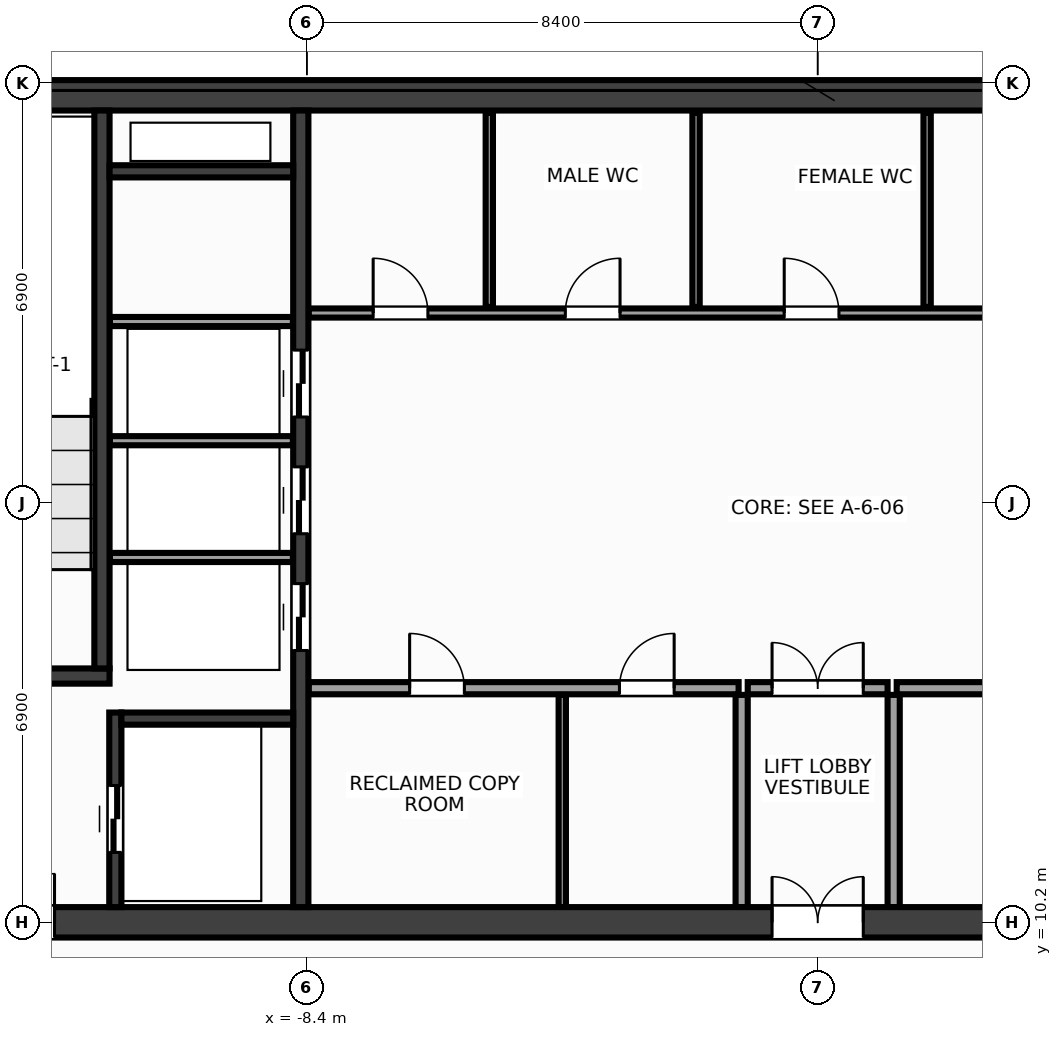
"""IFC4 building model, lengths in metres.
Left out: names, types, materials, properties, quantities, classifications, styles, units other than length and angle.
Written with IfcOpenShell. Run it as: python <this file> out.ifc"""

import sys

from ifc_helpers import new_model, si_unit, direction, frame, frame_2d, origin, place, context, subcontext, project, spatial, rectangle, extrude, source, transform, mapped, element, fill, save


model = new_model("IFC4")
c1 = context("Model", 3, precision=1e-05, world=origin(), true_north=direction((0.0, 1.0)))
c2 = subcontext(c1, "Body", "Model", "MODEL_VIEW")
j1 = project(units=[si_unit("LENGTHUNIT", "METRE"), si_unit("PLANEANGLEUNIT", "RADIAN")], contexts=[c1])
p1 = place(None, origin())
s1 = spatial("IfcSite", under=j1, at=p1, CompositionType="ELEMENT")
p2 = place(p1, origin())
s2 = spatial("IfcBuilding", under=s1, at=p2, CompositionType="ELEMENT")
p3 = place(p2, frame((0.0, 0.0, 210.8)))
s3 = spatial("IfcBuildingStorey", under=s2, at=p3, CompositionType="ELEMENT", Elevation=210.8)
m1 = source(origin(), c2, "Body", "SweptSolid", [
    extrude(rectangle(XDim=31.7, YDim=0.5, at=frame_2d((15.85, 0.0))), origin(), (0.0, 0.0, 1.0), 3.6),
])
p4 = place(p3, frame((-15.85, 23.8, 0.0), z_axis=(0.0, 0.0, 1.0), x_axis=(1.0, 0.0, 0.0)))
e1 = element("IfcWall", 1, at=p4, inside=s3, PredefinedType="SHEAR", context=c2, shape_type="MappedRepresentation", body=[
    mapped(m1, transform((0.0, 0.0, 0.0), x_axis=(1.0, 0.0, 0.0), y_axis=(0.0, 1.0, 0.0), z_axis=(0.0, 0.0, 1.0), scale=1.0)),
])
p5 = place(p3, frame((-15.85, 10.2, 0.0), z_axis=(0.0, 0.0, 1.0), x_axis=(1.0, 0.0, 0.0)))
e2 = element("IfcWall", 2, at=p5, inside=s3, PredefinedType="SHEAR", context=c2, shape_type="MappedRepresentation", body=[
    mapped(m1, transform((0.0, 0.0, 0.0), x_axis=(1.0, 0.0, 0.0), y_axis=(0.0, 1.0, 0.0), z_axis=(0.0, 0.0, 1.0), scale=1.0)),
])
p6 = place(p5, frame((1.7, 0.0, 0.0)))
e3 = element("IfcOpeningElement", 3, at=p6, cuts=e2, PredefinedType="OPENING", context=c2, shape_type="SweptSolid", body=[
    extrude(rectangle(XDim=1.6, YDim=2.15, at=frame_2d((0.8, 1.075))), frame((0.0, 0.262, 0.0), z_axis=(0.0, -1.0, 0.0), x_axis=(1.0, 0.0, 0.0)), (0.0, 0.0, 1.0), 0.524),
])
p7 = place(p5, frame((28.4, 0.0, 0.0)))
e4 = element("IfcOpeningElement", 4, at=p7, cuts=e2, PredefinedType="OPENING", context=c2, shape_type="SweptSolid", body=[
    extrude(rectangle(XDim=1.6, YDim=2.15, at=frame_2d((0.8, 1.075))), frame((0.0, 0.262, 0.0), z_axis=(0.0, -1.0, 0.0), x_axis=(1.0, 0.0, 0.0)), (0.0, 0.0, 1.0), 0.524),
])
p8 = place(p5, frame((15.1, 0.0, 0.0)))
e5 = element("IfcOpeningElement", 5, at=p8, cuts=e2, PredefinedType="OPENING", context=c2, shape_type="SweptSolid", body=[
    extrude(rectangle(XDim=1.5, YDim=2.2, at=frame_2d((0.75, 1.1))), frame((0.0, 0.262, 0.0), z_axis=(0.0, -1.0, 0.0), x_axis=(1.0, 0.0, 0.0)), (0.0, 0.0, 1.0), 0.524),
])
m2 = source(origin(), c2, "Body", "SweptSolid", [
    extrude(rectangle(XDim=13.1, YDim=0.25, at=frame_2d((6.55, 0.0))), origin(), (0.0, 0.0, 1.0), 3.6),
])
p9 = place(p3, frame((-8.5, 10.45, 0.0), z_axis=(0.0, 0.0, 1.0), x_axis=(0.0, 1.0, 0.0)))
e6 = element("IfcWall", 6, at=p9, inside=s3, PredefinedType="SHEAR", context=c2, shape_type="MappedRepresentation", body=[
    mapped(m2, transform((0.0, 0.0, 0.0), x_axis=(1.0, 0.0, 0.0), y_axis=(0.0, 1.0, 0.0), z_axis=(0.0, 0.0, 1.0), scale=1.0)),
])
p10 = place(p9, frame((4.22, 0.0, 0.0)))
e7 = element("IfcOpeningElement", 7, at=p10, cuts=e6, PredefinedType="OPENING", context=c2, shape_type="SweptSolid", body=[
    extrude(rectangle(XDim=1.1, YDim=2.15, at=frame_2d((0.55, 1.075))), frame((0.0, 0.137, 0.0), z_axis=(0.0, -1.0, 0.0), x_axis=(1.0, 0.0, 0.0)), (0.0, 0.0, 1.0), 0.274),
])
p11 = place(p9, frame((6.14, 0.0, 0.0)))
e8 = element("IfcOpeningElement", 8, at=p11, cuts=e6, PredefinedType="OPENING", context=c2, shape_type="SweptSolid", body=[
    extrude(rectangle(XDim=1.1, YDim=2.15, at=frame_2d((0.55, 1.075))), frame((0.0, 0.137, 0.0), z_axis=(0.0, -1.0, 0.0), x_axis=(1.0, 0.0, 0.0)), (0.0, 0.0, 1.0), 0.274),
])
p12 = place(p9, frame((8.06, 0.0, 0.0)))
e9 = element("IfcOpeningElement", 9, at=p12, cuts=e6, PredefinedType="OPENING", context=c2, shape_type="SweptSolid", body=[
    extrude(rectangle(XDim=1.1, YDim=2.15, at=frame_2d((0.55, 1.075))), frame((0.0, 0.137, 0.0), z_axis=(0.0, -1.0, 0.0), x_axis=(1.0, 0.0, 0.0)), (0.0, 0.0, 1.0), 0.274),
])
m3 = source(origin(), c2, "Body", "SweptSolid", [
    extrude(rectangle(XDim=3.705, YDim=0.25, at=frame_2d((1.853, 0.0))), origin(), (0.0, 0.0, 1.0), 3.6),
])
p13 = place(p3, frame((-15.35, 14.25, 0.0), z_axis=(0.0, 0.0, 1.0), x_axis=(1.0, 0.0, 0.0)))
e10 = element("IfcWall", 10, at=p13, inside=s3, PredefinedType="SHEAR", context=c2, shape_type="MappedRepresentation", body=[
    mapped(m3, transform((0.0, 0.0, 0.0), x_axis=(1.0, 0.0, 0.0), y_axis=(0.0, 1.0, 0.0), z_axis=(0.0, 0.0, 1.0), scale=1.0)),
])
p14 = place(p13, frame((0.95, 0.0, 0.0)))
e11 = element("IfcOpeningElement", 11, at=p14, cuts=e10, PredefinedType="OPENING", context=c2, shape_type="SweptSolid", body=[
    extrude(rectangle(XDim=1.6, YDim=2.15, at=frame_2d((0.8, 1.075))), frame((0.0, 0.137, 0.0), z_axis=(0.0, -1.0, 0.0), x_axis=(1.0, 0.0, 0.0)), (0.0, 0.0, 1.0), 0.274),
])
m4 = source(origin(), c2, "Body", "SweptSolid", [
    extrude(rectangle(XDim=9.175, YDim=0.25, at=frame_2d((4.587, 0.0))), origin(), (0.0, 0.0, 1.0), 3.6),
])
p15 = place(p3, frame((-11.77, 14.375, 0.0), z_axis=(0.0, 0.0, 1.0), x_axis=(0.0, 1.0, 0.0)))
e12 = element("IfcWall", 12, at=p15, inside=s3, PredefinedType="SHEAR", context=c2, shape_type="MappedRepresentation", body=[
    mapped(m4, transform((0.0, 0.0, 0.0), x_axis=(1.0, 0.0, 0.0), y_axis=(0.0, 1.0, 0.0), z_axis=(0.0, 0.0, 1.0), scale=1.0)),
])
m5 = source(origin(), c2, "Body", "SweptSolid", [
    extrude(rectangle(XDim=3.2, YDim=0.2, at=frame_2d((1.6, 0.0))), origin(), (0.0, 0.0, 1.0), 3.6),
])
p16 = place(p3, frame((-11.55, 10.45, 0.0), z_axis=(0.0, 0.0, 1.0), x_axis=(0.0, 1.0, 0.0)))
e13 = element("IfcWall", 13, at=p16, inside=s3, PredefinedType="SHEAR", context=c2, shape_type="MappedRepresentation", body=[
    mapped(m5, transform((0.0, 0.0, 0.0), x_axis=(1.0, 0.0, 0.0), y_axis=(0.0, 1.0, 0.0), z_axis=(0.0, 0.0, 1.0), scale=1.0)),
])
p17 = place(p16, frame((0.9, 0.0, 0.0)))
e14 = element("IfcOpeningElement", 14, at=p17, cuts=e13, PredefinedType="OPENING", context=c2, shape_type="SweptSolid", body=[
    extrude(rectangle(XDim=1.1, YDim=2.15, at=frame_2d((0.55, 1.075))), frame((0.0, 0.112, 0.0), z_axis=(0.0, -1.0, 0.0), x_axis=(1.0, 0.0, 0.0)), (0.0, 0.0, 1.0), 0.224),
])
m6 = source(origin(), c2, "Body", "SweptSolid", [
    extrude(rectangle(XDim=2.825, YDim=0.2, at=frame_2d((1.413, 0.0))), origin(), (0.0, 0.0, 1.0), 3.6),
])
p18 = place(p3, frame((-11.45, 13.55, 0.0), z_axis=(0.0, 0.0, 1.0), x_axis=(1.0, 0.0, 0.0)))
e15 = element("IfcWall", 15, at=p18, inside=s3, PredefinedType="SHEAR", context=c2, shape_type="MappedRepresentation", body=[
    mapped(m6, transform((0.0, 0.0, 0.0), x_axis=(1.0, 0.0, 0.0), y_axis=(0.0, 1.0, 0.0), z_axis=(0.0, 0.0, 1.0), scale=1.0)),
])
m7 = source(origin(), c2, "Body", "SweptSolid", [
    extrude(rectangle(XDim=3.02, YDim=0.2, at=frame_2d((1.51, 0.0))), origin(), (0.0, 0.0, 1.0), 3.6),
])
p19 = place(p3, frame((-11.645, 22.55, 0.0), z_axis=(0.0, 0.0, 1.0), x_axis=(1.0, 0.0, 0.0)))
e16 = element("IfcWall", 16, at=p19, inside=s3, PredefinedType="SHEAR", context=c2, shape_type="MappedRepresentation", body=[
    mapped(m7, transform((0.0, 0.0, 0.0), x_axis=(1.0, 0.0, 0.0), y_axis=(0.0, 1.0, 0.0), z_axis=(0.0, 0.0, 1.0), scale=1.0)),
])
m8 = source(origin(), c2, "Body", "SweptSolid", [
    extrude(rectangle(XDim=3.01, YDim=0.15, at=frame_2d((1.505, 0.0))), origin(), (0.0, 0.0, 1.0), 3.38),
])
for number, where, z_axis, x_axis in (
    (17, (-11.64, 16.2, 0.0), (0.0, 0.0, 1.0), (1.0, 0.0, 0.0)),
    (18, (-11.64, 18.12, 0.0), (0.0, 0.0, 1.0), (1.0, 0.0, 0.0)),
    (19, (-11.64, 20.08, 0.0), (0.0, 0.0, 1.0), (1.0, 0.0, 0.0)),
):
    element("IfcWall", number, at=place(p3, frame(where, z_axis=z_axis, x_axis=x_axis)), inside=s3, PredefinedType="PARTITIONING", context=c2, shape_type="MappedRepresentation", body=[
        mapped(m8, transform((0.0, 0.0, 0.0), x_axis=(1.0, 0.0, 0.0), y_axis=(0.0, 1.0, 0.0), z_axis=(0.0, 0.0, 1.0), scale=1.0)),
    ])
m9 = source(origin(), c2, "Body", "SweptSolid", [
    extrude(rectangle(XDim=7.07, YDim=0.2, at=frame_2d((3.535, 0.0))), origin(), (0.0, 0.0, 1.0), 3.38),
])
p20 = place(p3, frame((-8.37, 14.05, 0.0), z_axis=(0.0, 0.0, 1.0), x_axis=(1.0, 0.0, 0.0)))
e20 = element("IfcWall", 20, at=p20, inside=s3, PredefinedType="PARTITIONING", context=c2, shape_type="MappedRepresentation", body=[
    mapped(m9, transform((0.0, 0.0, 0.0), x_axis=(1.0, 0.0, 0.0), y_axis=(0.0, 1.0, 0.0), z_axis=(0.0, 0.0, 1.0), scale=1.0)),
])
p21 = place(p20, frame((1.66, 0.0, 0.0)))
e21 = element("IfcOpeningElement", 21, at=p21, cuts=e20, PredefinedType="OPENING", context=c2, shape_type="SweptSolid", body=[
    extrude(rectangle(XDim=0.9, YDim=2.15, at=frame_2d((0.45, 1.075))), frame((0.0, 0.112, 0.0), z_axis=(0.0, -1.0, 0.0), x_axis=(1.0, 0.0, 0.0)), (0.0, 0.0, 1.0), 0.224),
])
p22 = place(p20, frame((5.11, 0.0, 0.0)))
e22 = element("IfcOpeningElement", 22, at=p22, cuts=e20, PredefinedType="OPENING", context=c2, shape_type="SweptSolid", body=[
    extrude(rectangle(XDim=0.9, YDim=2.15, at=frame_2d((0.45, 1.075))), frame((0.0, 0.112, 0.0), z_axis=(0.0, -1.0, 0.0), x_axis=(1.0, 0.0, 0.0)), (0.0, 0.0, 1.0), 0.224),
])
p23 = place(p3, frame((1.3, 14.05, 0.0), z_axis=(0.0, 0.0, 1.0), x_axis=(1.0, 0.0, 0.0)))
e23 = element("IfcWall", 23, at=p23, inside=s3, PredefinedType="PARTITIONING", context=c2, shape_type="MappedRepresentation", body=[
    mapped(m9, transform((0.0, 0.0, 0.0), x_axis=(1.0, 0.0, 0.0), y_axis=(0.0, 1.0, 0.0), z_axis=(0.0, 0.0, 1.0), scale=1.0)),
])
p24 = place(p23, frame((2.8, 0.0, 0.0)))
e24 = element("IfcOpeningElement", 24, at=p24, cuts=e23, PredefinedType="OPENING", context=c2, shape_type="SweptSolid", body=[
    extrude(rectangle(XDim=0.98, YDim=2.15, at=frame_2d((0.49, 1.075))), frame((0.0, 0.112, 0.0), z_axis=(0.0, -1.0, 0.0), x_axis=(1.0, 0.0, 0.0)), (0.0, 0.0, 1.0), 0.224),
])
m10 = source(origin(), c2, "Body", "SweptSolid", [
    extrude(rectangle(XDim=3.49, YDim=0.2, at=frame_2d((1.745, 0.0))), origin(), (0.0, 0.0, 1.0), 3.38),
])
for number, where, z_axis, x_axis in (
    (25, (-1.25, 10.45, 0.0), (0.0, 0.0, 1.0), (0.0, 1.0, 0.0)),
    (26, (1.25, 10.45, 0.0), (0.0, 0.0, 1.0), (0.0, 1.0, 0.0)),
):
    element("IfcWall", number, at=place(p3, frame(where, z_axis=z_axis, x_axis=x_axis)), inside=s3, PredefinedType="PARTITIONING", context=c2, shape_type="MappedRepresentation", body=[
        mapped(m10, transform((0.0, 0.0, 0.0), x_axis=(1.0, 0.0, 0.0), y_axis=(0.0, 1.0, 0.0), z_axis=(0.0, 0.0, 1.0), scale=1.0)),
    ])
m11 = source(origin(), c2, "Body", "SweptSolid", [
    extrude(rectangle(XDim=2.3, YDim=0.2, at=frame_2d((1.15, 0.0))), origin(), (0.0, 0.0, 1.0), 3.38),
])
p25 = place(p3, frame((-1.15, 14.05, 0.0), z_axis=(0.0, 0.0, 1.0), x_axis=(1.0, 0.0, 0.0)))
e27 = element("IfcWall", 27, at=p25, inside=s3, PredefinedType="PARTITIONING", context=c2, shape_type="MappedRepresentation", body=[
    mapped(m11, transform((0.0, 0.0, 0.0), x_axis=(1.0, 0.0, 0.0), y_axis=(0.0, 1.0, 0.0), z_axis=(0.0, 0.0, 1.0), scale=1.0)),
])
p26 = place(p25, frame((0.4, 0.0, 0.0)))
e28 = element("IfcOpeningElement", 28, at=p26, cuts=e27, PredefinedType="OPENING", context=c2, shape_type="SweptSolid", body=[
    extrude(rectangle(XDim=1.5, YDim=2.2, at=frame_2d((0.75, 1.1))), frame((0.0, 0.112, 0.0), z_axis=(0.0, -1.0, 0.0), x_axis=(1.0, 0.0, 0.0)), (0.0, 0.0, 1.0), 0.224),
])
m12 = source(origin(), c2, "Body", "SweptSolid", [
    extrude(rectangle(XDim=14.59, YDim=0.15, at=frame_2d((7.295, 0.0))), origin(), (0.0, 0.0, 1.0), 3.38),
])
p27 = place(p3, frame((-8.37, 20.22, 0.0), z_axis=(0.0, 0.0, 1.0), x_axis=(1.0, 0.0, 0.0)))
e29 = element("IfcWall", 29, at=p27, inside=s3, PredefinedType="PARTITIONING", context=c2, shape_type="MappedRepresentation", body=[
    mapped(m12, transform((0.0, 0.0, 0.0), x_axis=(1.0, 0.0, 0.0), y_axis=(0.0, 1.0, 0.0), z_axis=(0.0, 0.0, 1.0), scale=1.0)),
])
p28 = place(p27, frame((1.06, 0.0, 0.0)))
e30 = element("IfcOpeningElement", 30, at=p28, cuts=e29, PredefinedType="OPENING", context=c2, shape_type="SweptSolid", body=[
    extrude(rectangle(XDim=0.9, YDim=2.15, at=frame_2d((0.45, 1.075))), frame((0.0, 0.087, 0.0), z_axis=(0.0, -1.0, 0.0), x_axis=(1.0, 0.0, 0.0)), (0.0, 0.0, 1.0), 0.174),
])
p29 = place(p27, frame((4.22, 0.0, 0.0)))
e31 = element("IfcOpeningElement", 31, at=p29, cuts=e29, PredefinedType="OPENING", context=c2, shape_type="SweptSolid", body=[
    extrude(rectangle(XDim=0.9, YDim=2.15, at=frame_2d((0.45, 1.075))), frame((0.0, 0.087, 0.0), z_axis=(0.0, -1.0, 0.0), x_axis=(1.0, 0.0, 0.0)), (0.0, 0.0, 1.0), 0.174),
])
p30 = place(p27, frame((7.82, 0.0, 0.0)))
e32 = element("IfcOpeningElement", 32, at=p30, cuts=e29, PredefinedType="OPENING", context=c2, shape_type="SweptSolid", body=[
    extrude(rectangle(XDim=0.9, YDim=2.15, at=frame_2d((0.45, 1.075))), frame((0.0, 0.087, 0.0), z_axis=(0.0, -1.0, 0.0), x_axis=(1.0, 0.0, 0.0)), (0.0, 0.0, 1.0), 0.174),
])
p31 = place(p27, frame((11.87, 0.0, 0.0)))
e33 = element("IfcOpeningElement", 33, at=p31, cuts=e29, PredefinedType="OPENING", context=c2, shape_type="SweptSolid", body=[
    extrude(rectangle(XDim=0.9, YDim=2.15, at=frame_2d((0.45, 1.075))), frame((0.0, 0.087, 0.0), z_axis=(0.0, -1.0, 0.0), x_axis=(1.0, 0.0, 0.0)), (0.0, 0.0, 1.0), 0.174),
])
m13 = source(origin(), c2, "Body", "SweptSolid", [
    extrude(rectangle(XDim=3.49, YDim=0.12, at=frame_2d((1.745, 0.0))), origin(), (0.0, 0.0, 1.0), 3.38),
])
p32 = place(p3, frame((-4.2, 10.45, 0.0), z_axis=(0.0, 0.0, 1.0), x_axis=(0.0, 1.0, 0.0)))
e34 = element("IfcWall", 34, at=p32, inside=s3, PredefinedType="PARTITIONING", context=c2, shape_type="MappedRepresentation", body=[
    mapped(m13, transform((0.0, 0.0, 0.0), x_axis=(1.0, 0.0, 0.0), y_axis=(0.0, 1.0, 0.0), z_axis=(0.0, 0.0, 1.0), scale=1.0)),
])
m14 = source(origin(), c2, "Body", "SweptSolid", [
    extrude(rectangle(XDim=3.19, YDim=0.12, at=frame_2d((1.595, 0.0))), origin(), (0.0, 0.0, 1.0), 3.38),
])
for number, where, z_axis, x_axis in (
    (35, (-5.4, 20.32, 0.0), (0.0, 0.0, 1.0), (0.0, 1.0, 0.0)),
    (36, (-2.0, 20.32, 0.0), (0.0, 0.0, 1.0), (0.0, 1.0, 0.0)),
    (37, (1.8, 20.32, 0.0), (0.0, 0.0, 1.0), (0.0, 1.0, 0.0)),
):
    element("IfcWall", number, at=place(p3, frame(where, z_axis=z_axis, x_axis=x_axis)), inside=s3, PredefinedType="PARTITIONING", context=c2, shape_type="MappedRepresentation", body=[
        mapped(m14, transform((0.0, 0.0, 0.0), x_axis=(1.0, 0.0, 0.0), y_axis=(0.0, 1.0, 0.0), z_axis=(0.0, 0.0, 1.0), scale=1.0)),
    ])
m15 = source(origin(), c2, "Body", "SweptSolid", [
    extrude(rectangle(XDim=1.6, YDim=2.15, at=frame_2d((0.8, 1.075))), frame((0.0, 0.025, 0.0), z_axis=(0.0, -1.0, 0.0), x_axis=(1.0, 0.0, 0.0)), (0.0, 0.0, 1.0), 0.05),
])
p33 = place(p6, origin())
e38 = element("IfcDoor", 38, at=p33, inside=s3, OperationType="DOUBLE_DOOR_SINGLE_SWING", PredefinedType="DOOR", context=c2, shape_type="MappedRepresentation", body=[
    mapped(m15, transform((0.0, 0.0, 0.0), x_axis=(1.0, 0.0, 0.0), y_axis=(0.0, 1.0, 0.0), z_axis=(0.0, 0.0, 1.0), scale=1.0)),
])
fill(e3, e38)
m16 = source(origin(), c2, "Body", "SweptSolid", [
    extrude(rectangle(XDim=1.1, YDim=2.15, at=frame_2d((0.55, 1.075))), frame((0.0, 0.025, 0.0), z_axis=(0.0, -1.0, 0.0), x_axis=(1.0, 0.0, 0.0)), (0.0, 0.0, 1.0), 0.05),
])
p34 = place(p17, origin())
e39 = element("IfcDoor", 39, at=p34, inside=s3, OperationType="DOUBLE_DOOR_SLIDING", PredefinedType="DOOR", context=c2, shape_type="MappedRepresentation", body=[
    mapped(m16, transform((0.0, 0.0, 0.0), x_axis=(1.0, 0.0, 0.0), y_axis=(0.0, 1.0, 0.0), z_axis=(0.0, 0.0, 1.0), scale=1.0)),
])
fill(e14, e39)
p35 = place(p10, origin())
e40 = element("IfcDoor", 40, at=p35, inside=s3, OperationType="DOUBLE_DOOR_SLIDING", PredefinedType="DOOR", context=c2, shape_type="MappedRepresentation", body=[
    mapped(m16, transform((0.0, 0.0, 0.0), x_axis=(1.0, 0.0, 0.0), y_axis=(0.0, 1.0, 0.0), z_axis=(0.0, 0.0, 1.0), scale=1.0)),
])
fill(e7, e40)
p36 = place(p11, origin())
e41 = element("IfcDoor", 41, at=p36, inside=s3, OperationType="DOUBLE_DOOR_SLIDING", PredefinedType="DOOR", context=c2, shape_type="MappedRepresentation", body=[
    mapped(m16, transform((0.0, 0.0, 0.0), x_axis=(1.0, 0.0, 0.0), y_axis=(0.0, 1.0, 0.0), z_axis=(0.0, 0.0, 1.0), scale=1.0)),
])
fill(e8, e41)
p37 = place(p12, origin())
e42 = element("IfcDoor", 42, at=p37, inside=s3, OperationType="DOUBLE_DOOR_SLIDING", PredefinedType="DOOR", context=c2, shape_type="MappedRepresentation", body=[
    mapped(m16, transform((0.0, 0.0, 0.0), x_axis=(1.0, 0.0, 0.0), y_axis=(0.0, 1.0, 0.0), z_axis=(0.0, 0.0, 1.0), scale=1.0)),
])
fill(e9, e42)
m17 = source(origin(), c2, "Body", "SweptSolid", [
    extrude(rectangle(XDim=0.9, YDim=2.15, at=frame_2d((0.45, 1.075))), frame((0.0, 0.025, 0.0), z_axis=(0.0, -1.0, 0.0), x_axis=(1.0, 0.0, 0.0)), (0.0, 0.0, 1.0), 0.05),
])
p38 = place(p21, origin())
e43 = element("IfcDoor", 43, at=p38, inside=s3, OperationType="SINGLE_SWING_LEFT", PredefinedType="DOOR", context=c2, shape_type="MappedRepresentation", body=[
    mapped(m17, transform((0.0, 0.0, 0.0), x_axis=(1.0, 0.0, 0.0), y_axis=(0.0, 1.0, 0.0), z_axis=(0.0, 0.0, 1.0), scale=1.0)),
])
fill(e21, e43)
p39 = place(p22, origin())
e44 = element("IfcDoor", 44, at=p39, inside=s3, OperationType="SINGLE_SWING_RIGHT", PredefinedType="DOOR", context=c2, shape_type="MappedRepresentation", body=[
    mapped(m17, transform((0.0, 0.0, 0.0), x_axis=(1.0, 0.0, 0.0), y_axis=(0.0, 1.0, 0.0), z_axis=(0.0, 0.0, 1.0), scale=1.0)),
])
fill(e22, e44)
m18 = source(origin(), c2, "Body", "SweptSolid", [
    extrude(rectangle(XDim=1.5, YDim=2.2, at=frame_2d((0.75, 1.1))), frame((0.0, 0.025, 0.0), z_axis=(0.0, -1.0, 0.0), x_axis=(1.0, 0.0, 0.0)), (0.0, 0.0, 1.0), 0.05),
])
p40 = place(p26, origin())
e45 = element("IfcDoor", 45, at=p40, inside=s3, OperationType="DOUBLE_DOOR_SINGLE_SWING", PredefinedType="DOOR", context=c2, shape_type="MappedRepresentation", body=[
    mapped(m18, transform((0.0, 0.0, 0.0), x_axis=(1.0, 0.0, 0.0), y_axis=(0.0, 1.0, 0.0), z_axis=(0.0, 0.0, 1.0), scale=1.0)),
])
fill(e28, e45)
p41 = place(p8, origin())
e46 = element("IfcDoor", 46, at=p41, inside=s3, OperationType="DOUBLE_DOOR_SINGLE_SWING", PredefinedType="DOOR", context=c2, shape_type="MappedRepresentation", body=[
    mapped(m18, transform((0.0, 0.0, 0.0), x_axis=(1.0, 0.0, 0.0), y_axis=(0.0, 1.0, 0.0), z_axis=(0.0, 0.0, 1.0), scale=1.0)),
])
fill(e5, e46)
p42 = place(p28, origin())
e47 = element("IfcDoor", 47, at=p42, inside=s3, OperationType="SINGLE_SWING_LEFT", PredefinedType="DOOR", context=c2, shape_type="MappedRepresentation", body=[
    mapped(m17, transform((0.0, 0.0, 0.0), x_axis=(1.0, 0.0, 0.0), y_axis=(0.0, 1.0, 0.0), z_axis=(0.0, 0.0, 1.0), scale=1.0)),
])
fill(e30, e47)
p43 = place(p29, origin())
e48 = element("IfcDoor", 48, at=p43, inside=s3, OperationType="SINGLE_SWING_RIGHT", PredefinedType="DOOR", context=c2, shape_type="MappedRepresentation", body=[
    mapped(m17, transform((0.0, 0.0, 0.0), x_axis=(1.0, 0.0, 0.0), y_axis=(0.0, 1.0, 0.0), z_axis=(0.0, 0.0, 1.0), scale=1.0)),
])
fill(e31, e48)
p44 = place(p30, origin())
e49 = element("IfcDoor", 49, at=p44, inside=s3, OperationType="SINGLE_SWING_LEFT", PredefinedType="DOOR", context=c2, shape_type="MappedRepresentation", body=[
    mapped(m17, transform((0.0, 0.0, 0.0), x_axis=(1.0, 0.0, 0.0), y_axis=(0.0, 1.0, 0.0), z_axis=(0.0, 0.0, 1.0), scale=1.0)),
])
fill(e32, e49)
save(model, sys.argv[1])
